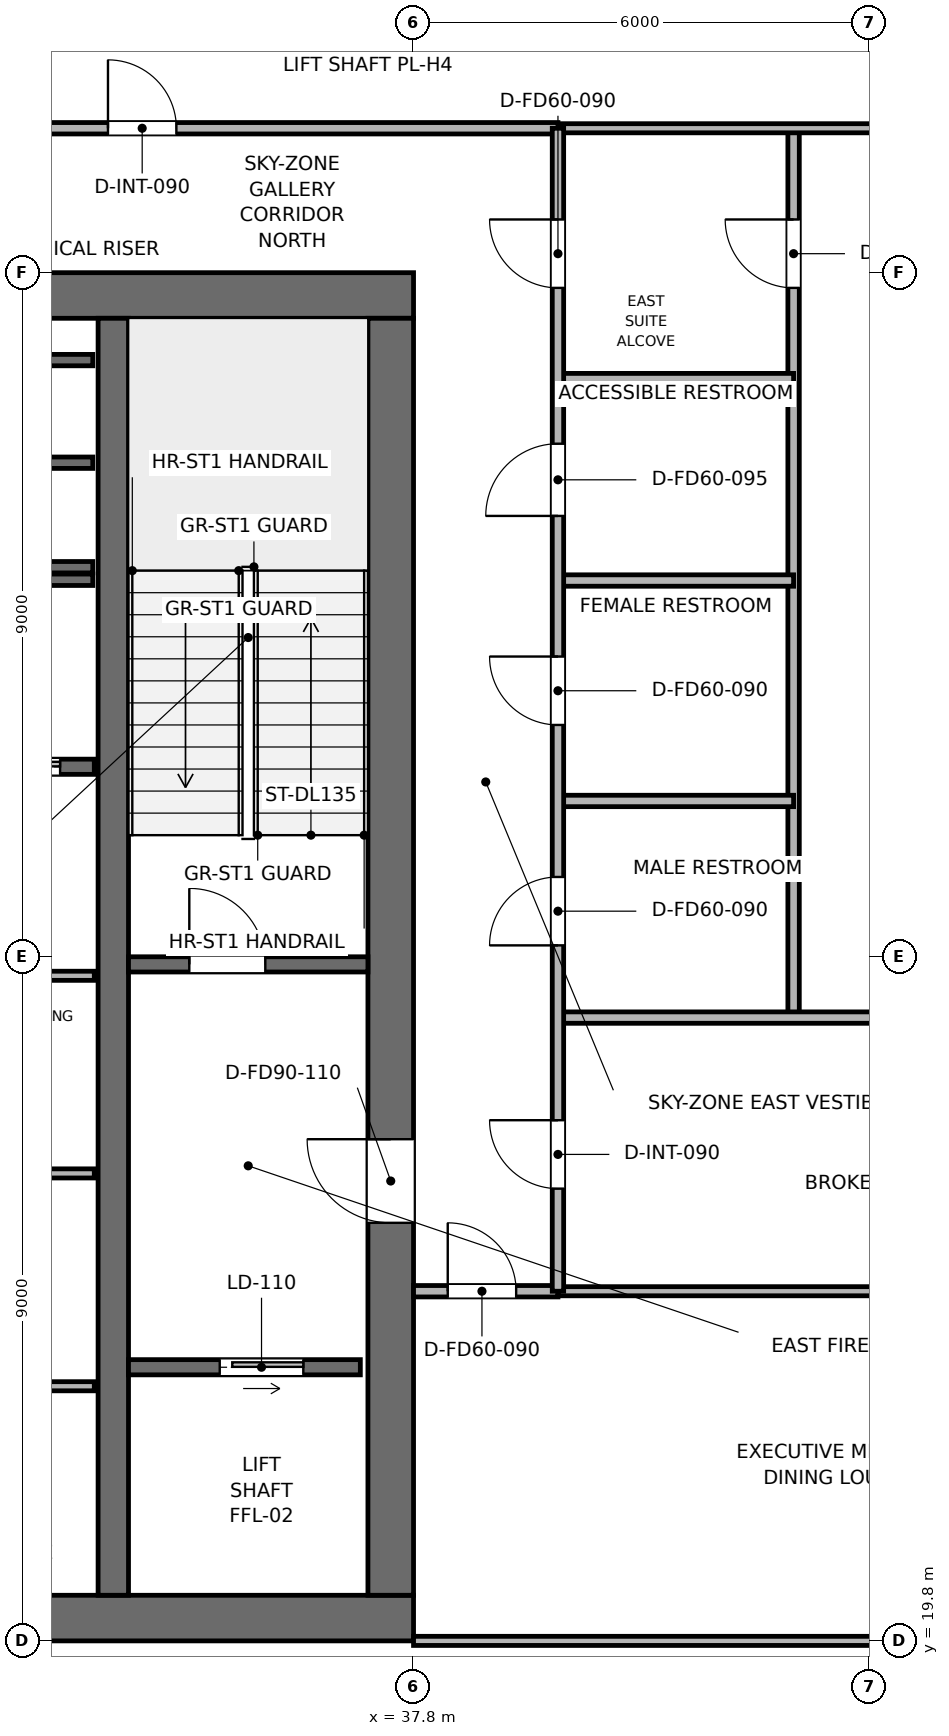
"""IFC4 building model, lengths in metres.
Left out: names, types, materials, properties, quantities, classifications, styles, units other than length and angle.
Written with IfcOpenShell. Run it as: python <this file> out.ifc"""

import sys

from ifc_helpers import new_model, si_unit, direction, frame, frame_2d, origin, place, context, subcontext, project, spatial, rectangle, extrude, element, fill, save


model = new_model("IFC4")
c1 = context("Model", 3, precision=1e-05, world=origin(), true_north=direction((0.0, 1.0)))
c2 = subcontext(c1, "Body", "Model", "MODEL_VIEW")
j1 = project(units=[si_unit("LENGTHUNIT", "METRE"), si_unit("PLANEANGLEUNIT", "RADIAN")], contexts=[c1])
p1 = place(None, origin())
s1 = spatial("IfcSite", under=j1, at=p1, CompositionType="ELEMENT")
p2 = place(p1, origin())
s2 = spatial("IfcBuilding", under=s1, at=p2, CompositionType="ELEMENT")
p3 = place(p2, frame((0.0, 0.0, 355.5)))
s3 = spatial("IfcBuildingStorey", under=s2, at=p3, CompositionType="ELEMENT", Elevation=355.5)
p4 = place(p3, frame((19.8, 20.1, 0.0), z_axis=(0.0, 0.0, 1.0), x_axis=(1.0, 0.0, 0.0)))
e1 = element("IfcWall", 1, at=p4, inside=s3, PredefinedType="SHEAR", context=c2, shape_type="SweptSolid", body=[
    extrude(rectangle(XDim=18.0, YDim=0.6, at=frame_2d((9.0, 0.0))), origin(), (0.0, 0.0, 1.0), 4.5),
])
p5 = place(p3, frame((19.8, 37.5, 0.0), z_axis=(0.0, 0.0, 1.0), x_axis=(1.0, 0.0, 0.0)))
e2 = element("IfcWall", 2, at=p5, inside=s3, PredefinedType="SHEAR", context=c2, shape_type="SweptSolid", body=[
    extrude(rectangle(XDim=18.0, YDim=0.6, at=frame_2d((9.0, 0.0))), origin(), (0.0, 0.0, 1.0), 4.5),
])
p6 = place(p5, frame((7.05, 0.0, 0.0)))
e3 = element("IfcOpeningElement", 3, at=p6, cuts=e2, PredefinedType="OPENING", context=c2, shape_type="SweptSolid", body=[
    extrude(rectangle(XDim=1.1, YDim=2.15, at=frame_2d((0.55, 1.075))), frame((0.0, 0.31, 0.0), z_axis=(0.0, -1.0, 0.0), x_axis=(1.0, 0.0, 0.0)), (0.0, 0.0, 1.0), 0.62),
])
p7 = place(p3, frame((37.5, 20.4, 0.0), z_axis=(0.0, 0.0, 1.0), x_axis=(0.0, 1.0, 0.0)))
e4 = element("IfcWall", 4, at=p7, inside=s3, PredefinedType="SHEAR", context=c2, shape_type="SweptSolid", body=[
    extrude(rectangle(XDim=16.8, YDim=0.6, at=frame_2d((8.4, 0.0))), origin(), (0.0, 0.0, 1.0), 4.5),
])
p8 = place(p7, frame((4.9, 0.0, 0.0)))
e5 = element("IfcOpeningElement", 5, at=p8, cuts=e4, PredefinedType="OPENING", context=c2, shape_type="SweptSolid", body=[
    extrude(rectangle(XDim=1.1, YDim=2.15, at=frame_2d((0.55, 1.075))), frame((0.0, 0.31, 0.0), z_axis=(0.0, -1.0, 0.0), x_axis=(1.0, 0.0, 0.0)), (0.0, 0.0, 1.0), 0.62),
])
p9 = place(p3, frame((33.85, 20.4, 0.0), z_axis=(0.0, 0.0, 1.0), x_axis=(0.0, 1.0, 0.0)))
e6 = element("IfcWall", 6, at=p9, inside=s3, PredefinedType="SHEAR", context=c2, shape_type="SweptSolid", body=[
    extrude(rectangle(XDim=16.8, YDim=0.4, at=frame_2d((8.4, 0.0))), origin(), (0.0, 0.0, 1.0), 4.5),
])
p10 = place(p3, frame((34.05, 28.7, 0.0), z_axis=(0.0, 0.0, 1.0), x_axis=(1.0, 0.0, 0.0)))
e7 = element("IfcWall", 7, at=p10, inside=s3, PredefinedType="SHEAR", context=c2, shape_type="SweptSolid", body=[
    extrude(rectangle(XDim=3.15, YDim=0.2, at=frame_2d((1.575, 0.0))), origin(), (0.0, 0.0, 1.0), 4.24),
])
p11 = place(p10, frame((0.8, 0.0, 0.0)))
e8 = element("IfcOpeningElement", 8, at=p11, cuts=e7, PredefinedType="OPENING", context=c2, shape_type="SweptSolid", body=[
    extrude(rectangle(XDim=1.0, YDim=2.1, at=frame_2d((0.5, 1.05))), frame((0.0, 0.11, 0.0), z_axis=(0.0, -1.0, 0.0), x_axis=(1.0, 0.0, 0.0)), (0.0, 0.0, 1.0), 0.22),
])
for number, where, z_axis, x_axis in (
    (9, (32.25, 33.925, 0.0), (0.0, 0.0, 1.0), (1.0, 0.0, 0.0)),
    (10, (32.25, 35.3, 0.0), (0.0, 0.0, 1.0), (1.0, 0.0, 0.0)),
):
    element("IfcWall", number, at=place(p3, frame(where, z_axis=z_axis, x_axis=x_axis)), inside=s3, PredefinedType="SHEAR", context=c2, shape_type="SweptSolid", body=[
        extrude(rectangle(XDim=1.33, YDim=0.15, at=frame_2d((0.665, 0.0))), origin(), (0.0, 0.0, 1.0), 4.24),
    ])
p12 = place(p3, frame((34.05, 23.4, 0.0), z_axis=(0.0, 0.0, 1.0), x_axis=(1.0, 0.0, 0.0)))
e11 = element("IfcWall", 11, at=p12, inside=s3, PredefinedType="SHEAR", context=c2, shape_type="SweptSolid", body=[
    extrude(rectangle(XDim=3.05, YDim=0.2, at=frame_2d((1.525, 0.0))), origin(), (0.0, 0.0, 1.0), 4.24),
])
p13 = place(p12, frame((1.2, 0.0, 0.0)))
e12 = element("IfcOpeningElement", 12, at=p13, cuts=e11, PredefinedType="OPENING", context=c2, shape_type="SweptSolid", body=[
    extrude(rectangle(XDim=1.1, YDim=2.15, at=frame_2d((0.55, 1.075))), frame((0.0, 0.11, 0.0), z_axis=(0.0, -1.0, 0.0), x_axis=(1.0, 0.0, 0.0)), (0.0, 0.0, 1.0), 0.22),
])
p14 = place(p3, frame((31.6, 31.3, 0.0), z_axis=(0.0, 0.0, 1.0), x_axis=(1.0, 0.0, 0.0)))
e13 = element("IfcWall", 13, at=p14, inside=s3, PredefinedType="SHEAR", context=c2, shape_type="SweptSolid", body=[
    extrude(rectangle(XDim=2.0, YDim=0.2, at=frame_2d((1.0, 0.0))), origin(), (0.0, 0.0, 1.0), 4.24),
])
p15 = place(p14, frame((0.45, 0.0, 0.0)))
e14 = element("IfcOpeningElement", 14, at=p15, cuts=e13, PredefinedType="OPENING", context=c2, shape_type="SweptSolid", body=[
    extrude(rectangle(XDim=1.1, YDim=2.15, at=frame_2d((0.55, 1.075))), frame((0.0, 0.11, 0.0), z_axis=(0.0, -1.0, 0.0), x_axis=(1.0, 0.0, 0.0)), (0.0, 0.0, 1.0), 0.22),
])
p16 = place(p3, frame((32.25, 36.65, 0.0), z_axis=(0.0, 0.0, 1.0), x_axis=(1.0, 0.0, 0.0)))
e15 = element("IfcWall", 15, at=p16, inside=s3, PredefinedType="SHEAR", context=c2, shape_type="SweptSolid", body=[
    extrude(rectangle(XDim=1.33, YDim=0.15, at=frame_2d((0.665, 0.0))), origin(), (0.0, 0.0, 1.0), 4.24),
])
p17 = place(p3, frame((29.5, 33.76, 0.0), z_axis=(0.0, 0.0, 1.0), x_axis=(1.0, 0.0, 0.0)))
e16 = element("IfcWall", 16, at=p17, inside=s3, PredefinedType="SHEAR", context=c2, shape_type="SweptSolid", body=[
    extrude(rectangle(XDim=4.08, YDim=0.15, at=frame_2d((2.04, 0.0))), origin(), (0.0, 0.0, 1.0), 4.24),
])
p18 = place(p3, frame((29.55, 23.15, 0.0), z_axis=(0.0, 0.0, 1.0), x_axis=(1.0, 0.0, 0.0)))
e17 = element("IfcWall", 17, at=p18, inside=s3, PredefinedType="PARTITIONING", context=c2, shape_type="SweptSolid", body=[
    extrude(rectangle(XDim=4.05, YDim=0.12, at=frame_2d((2.025, 0.0))), origin(), (0.0, 0.0, 1.0), 4.24),
])
p19 = place(p18, frame((1.575, 0.0, 0.0)))
e18 = element("IfcOpeningElement", 18, at=p19, cuts=e17, PredefinedType="OPENING", context=c2, shape_type="SweptSolid", body=[
    extrude(rectangle(XDim=0.9, YDim=2.1, at=frame_2d((0.45, 1.05))), frame((0.0, 0.07, 0.0), z_axis=(0.0, -1.0, 0.0), x_axis=(1.0, 0.0, 0.0)), (0.0, 0.0, 1.0), 0.14),
])
p20 = place(p3, frame((29.55, 25.95, 0.0), z_axis=(0.0, 0.0, 1.0), x_axis=(1.0, 0.0, 0.0)))
e19 = element("IfcWall", 19, at=p20, inside=s3, PredefinedType="PARTITIONING", context=c2, shape_type="SweptSolid", body=[
    extrude(rectangle(XDim=4.05, YDim=0.12, at=frame_2d((2.025, 0.0))), origin(), (0.0, 0.0, 1.0), 4.24),
])
p21 = place(p20, frame((1.575, 0.0, 0.0)))
e20 = element("IfcOpeningElement", 20, at=p21, cuts=e19, PredefinedType="OPENING", context=c2, shape_type="SweptSolid", body=[
    extrude(rectangle(XDim=0.9, YDim=2.1, at=frame_2d((0.45, 1.05))), frame((0.0, 0.07, 0.0), z_axis=(0.0, -1.0, 0.0), x_axis=(1.0, 0.0, 0.0)), (0.0, 0.0, 1.0), 0.14),
])
p22 = place(p3, frame((29.55, 28.55, 0.0), z_axis=(0.0, 0.0, 1.0), x_axis=(1.0, 0.0, 0.0)))
e21 = element("IfcWall", 21, at=p22, inside=s3, PredefinedType="PARTITIONING", context=c2, shape_type="SweptSolid", body=[
    extrude(rectangle(XDim=4.05, YDim=0.12, at=frame_2d((2.025, 0.0))), origin(), (0.0, 0.0, 1.0), 4.24),
])
p23 = place(p3, frame((37.8, 19.8, 0.0), z_axis=(0.0, 0.0, 1.0), x_axis=(1.0, 0.0, 0.0)))
e22 = element("IfcWall", 22, at=p23, inside=s3, PredefinedType="PARTITIONING", context=c2, shape_type="SweptSolid", body=[
    extrude(rectangle(XDim=11.27, YDim=0.12, at=frame_2d((5.635, 0.0))), origin(), (0.0, 0.0, 1.0), 3.825),
])
p24 = place(p3, frame((37.8, 24.4, 0.0), z_axis=(0.0, 0.0, 1.0), x_axis=(1.0, 0.0, 0.0)))
e23 = element("IfcWall", 23, at=p24, inside=s3, PredefinedType="PARTITIONING", context=c2, shape_type="SweptSolid", body=[
    extrude(rectangle(XDim=1.9, YDim=0.15, at=frame_2d((0.95, 0.0))), origin(), (0.0, 0.0, 1.0), 4.24),
])
p25 = place(p24, frame((0.45, 0.0, 0.0)))
e24 = element("IfcOpeningElement", 24, at=p25, cuts=e23, PredefinedType="OPENING", context=c2, shape_type="SweptSolid", body=[
    extrude(rectangle(XDim=0.9, YDim=2.1, at=frame_2d((0.45, 1.05))), frame((0.0, 0.085, 0.0), z_axis=(0.0, -1.0, 0.0), x_axis=(1.0, 0.0, 0.0)), (0.0, 0.0, 1.0), 0.17),
])
p26 = place(p3, frame((39.7, 24.4, 0.0), z_axis=(0.0, 0.0, 1.0), x_axis=(1.0, 0.0, 0.0)))
e25 = element("IfcWall", 25, at=p26, inside=s3, PredefinedType="PARTITIONING", context=c2, shape_type="SweptSolid", body=[
    extrude(rectangle(XDim=9.37, YDim=0.12, at=frame_2d((4.685, 0.0))), origin(), (0.0, 0.0, 1.0), 3.865),
])
p27 = place(p3, frame((42.8, 28.0, 0.0), z_axis=(0.0, 0.0, 1.0), x_axis=(0.0, 1.0, 0.0)))
e26 = element("IfcWall", 26, at=p27, inside=s3, PredefinedType="PARTITIONING", context=c2, shape_type="SweptSolid", body=[
    extrude(rectangle(XDim=11.7, YDim=0.15, at=frame_2d((5.85, 0.0))), origin(), (0.0, 0.0, 1.0), 3.825),
])
p28 = place(p27, frame((9.6, 0.0, 0.0)))
e27 = element("IfcOpeningElement", 27, at=p28, cuts=e26, PredefinedType="OPENING", context=c2, shape_type="SweptSolid", body=[
    extrude(rectangle(XDim=0.9, YDim=2.1, at=frame_2d((0.45, 1.05))), frame((0.0, 0.085, 0.0), z_axis=(0.0, -1.0, 0.0), x_axis=(1.0, 0.0, 0.0)), (0.0, 0.0, 1.0), 0.17),
])
p29 = place(p3, frame((39.7, 28.0, 0.0), z_axis=(0.0, 0.0, 1.0), x_axis=(1.0, 0.0, 0.0)))
e28 = element("IfcWall", 28, at=p29, inside=s3, PredefinedType="PARTITIONING", context=c2, shape_type="SweptSolid", body=[
    extrude(rectangle(XDim=9.37, YDim=0.15, at=frame_2d((4.685, 0.0))), origin(), (0.0, 0.0, 1.0), 3.865),
])
for number, where, z_axis, x_axis in (
    (29, (39.7, 36.4, 0.0), (0.0, 0.0, 1.0), (1.0, 0.0, 0.0)),
    (30, (39.7, 30.85, 0.0), (0.0, 0.0, 1.0), (1.0, 0.0, 0.0)),
    (31, (39.7, 33.75, 0.0), (0.0, 0.0, 1.0), (1.0, 0.0, 0.0)),
):
    element("IfcWall", number, at=place(p3, frame(where, z_axis=z_axis, x_axis=x_axis)), inside=s3, PredefinedType="PARTITIONING", context=c2, shape_type="SweptSolid", body=[
        extrude(rectangle(XDim=3.1, YDim=0.15, at=frame_2d((1.55, 0.0))), origin(), (0.0, 0.0, 1.0), 3.865),
    ])
p30 = place(p3, frame((39.7, 39.7, 0.0), z_axis=(0.0, 0.0, 1.0), x_axis=(1.0, 0.0, 0.0)))
e32 = element("IfcWall", 32, at=p30, inside=s3, PredefinedType="PARTITIONING", context=c2, shape_type="SweptSolid", body=[
    extrude(rectangle(XDim=9.37, YDim=0.12, at=frame_2d((4.685, 0.0))), origin(), (0.0, 0.0, 1.0), 3.825),
])
p31 = place(p3, frame((17.9, 39.7, 0.0), z_axis=(0.0, 0.0, 1.0), x_axis=(1.0, 0.0, 0.0)))
e33 = element("IfcWall", 33, at=p31, inside=s3, PredefinedType="PARTITIONING", context=c2, shape_type="SweptSolid", body=[
    extrude(rectangle(XDim=21.8, YDim=0.15, at=frame_2d((10.9, 0.0))), origin(), (0.0, 0.0, 1.0), 3.825),
])
p32 = place(p31, frame((0.765, 0.0, 0.0)))
e34 = element("IfcOpeningElement", 34, at=p32, cuts=e33, PredefinedType="OPENING", context=c2, shape_type="SweptSolid", body=[
    extrude(rectangle(XDim=0.9, YDim=2.1, at=frame_2d((0.45, 1.05))), frame((0.0, 0.085, 0.0), z_axis=(0.0, -1.0, 0.0), x_axis=(1.0, 0.0, 0.0)), (0.0, 0.0, 1.0), 0.17),
])
p33 = place(p31, frame((6.195, 0.0, 0.0)))
e35 = element("IfcOpeningElement", 35, at=p33, cuts=e33, PredefinedType="OPENING", context=c2, shape_type="SweptSolid", body=[
    extrude(rectangle(XDim=0.9, YDim=2.1, at=frame_2d((0.45, 1.05))), frame((0.0, 0.085, 0.0), z_axis=(0.0, -1.0, 0.0), x_axis=(1.0, 0.0, 0.0)), (0.0, 0.0, 1.0), 0.17),
])
p34 = place(p31, frame((15.88, 0.0, 0.0)))
e36 = element("IfcOpeningElement", 36, at=p34, cuts=e33, PredefinedType="OPENING", context=c2, shape_type="SweptSolid", body=[
    extrude(rectangle(XDim=0.9, YDim=2.1, at=frame_2d((0.45, 1.05))), frame((0.0, 0.085, 0.0), z_axis=(0.0, -1.0, 0.0), x_axis=(1.0, 0.0, 0.0)), (0.0, 0.0, 1.0), 0.17),
])
p35 = place(p3, frame((39.7, 24.4, 0.0), z_axis=(0.0, 0.0, 1.0), x_axis=(0.0, 1.0, 0.0)))
e37 = element("IfcWall", 37, at=p35, inside=s3, PredefinedType="PARTITIONING", context=c2, shape_type="SweptSolid", body=[
    extrude(rectangle(XDim=15.3, YDim=0.15, at=frame_2d((7.65, 0.0))), origin(), (0.0, 0.0, 1.0), 3.825),
])
p36 = place(p35, frame((1.35, 0.0, 0.0)))
e38 = element("IfcOpeningElement", 38, at=p36, cuts=e37, PredefinedType="OPENING", context=c2, shape_type="SweptSolid", body=[
    extrude(rectangle(XDim=0.9, YDim=2.1, at=frame_2d((0.45, 1.05))), frame((0.0, 0.085, 0.0), z_axis=(0.0, -1.0, 0.0), x_axis=(1.0, 0.0, 0.0)), (0.0, 0.0, 1.0), 0.17),
])
p37 = place(p35, frame((4.55, 0.0, 0.0)))
e39 = element("IfcOpeningElement", 39, at=p37, cuts=e37, PredefinedType="OPENING", context=c2, shape_type="SweptSolid", body=[
    extrude(rectangle(XDim=0.9, YDim=2.1, at=frame_2d((0.45, 1.05))), frame((0.0, 0.085, 0.0), z_axis=(0.0, -1.0, 0.0), x_axis=(1.0, 0.0, 0.0)), (0.0, 0.0, 1.0), 0.17),
])
p38 = place(p35, frame((7.45, 0.0, 0.0)))
e40 = element("IfcOpeningElement", 40, at=p38, cuts=e37, PredefinedType="OPENING", context=c2, shape_type="SweptSolid", body=[
    extrude(rectangle(XDim=0.9, YDim=2.1, at=frame_2d((0.45, 1.05))), frame((0.0, 0.085, 0.0), z_axis=(0.0, -1.0, 0.0), x_axis=(1.0, 0.0, 0.0)), (0.0, 0.0, 1.0), 0.17),
])
p39 = place(p35, frame((10.2, 0.0, 0.0)))
e41 = element("IfcOpeningElement", 41, at=p39, cuts=e37, PredefinedType="OPENING", context=c2, shape_type="SweptSolid", body=[
    extrude(rectangle(XDim=0.95, YDim=2.1, at=frame_2d((0.475, 1.05))), frame((0.0, 0.085, 0.0), z_axis=(0.0, -1.0, 0.0), x_axis=(1.0, 0.0, 0.0)), (0.0, 0.0, 1.0), 0.17),
])
p40 = place(p35, frame((13.2, 0.0, 0.0)))
e42 = element("IfcOpeningElement", 42, at=p40, cuts=e37, PredefinedType="OPENING", context=c2, shape_type="SweptSolid", body=[
    extrude(rectangle(XDim=0.9, YDim=2.1, at=frame_2d((0.45, 1.05))), frame((0.0, 0.085, 0.0), z_axis=(0.0, -1.0, 0.0), x_axis=(1.0, 0.0, 0.0)), (0.0, 0.0, 1.0), 0.17),
])
p41 = place(p11, origin())
e43 = element("IfcDoor", 43, at=p41, inside=s3, OperationType="SINGLE_SWING_LEFT", PredefinedType="DOOR", context=c2, shape_type="SweptSolid", body=[
    extrude(rectangle(XDim=1.0, YDim=2.1, at=frame_2d((0.5, 1.05))), frame((0.0, 0.025, 0.0), z_axis=(0.0, -1.0, 0.0), x_axis=(1.0, 0.0, 0.0)), (0.0, 0.0, 1.0), 0.05),
])
fill(e8, e43)
p42 = place(p13, origin())
e44 = element("IfcDoor", 44, at=p42, inside=s3, OperationType="SLIDING_TO_RIGHT", PredefinedType="DOOR", context=c2, shape_type="SweptSolid", body=[
    extrude(rectangle(XDim=1.1, YDim=2.15, at=frame_2d((0.55, 1.075))), frame((0.0, 0.025, 0.0), z_axis=(0.0, -1.0, 0.0), x_axis=(1.0, 0.0, 0.0)), (0.0, 0.0, 1.0), 0.05),
])
fill(e12, e44)
p43 = place(p15, origin())
e45 = element("IfcDoor", 45, at=p43, inside=s3, OperationType="SLIDING_TO_RIGHT", PredefinedType="DOOR", context=c2, shape_type="SweptSolid", body=[
    extrude(rectangle(XDim=1.1, YDim=2.15, at=frame_2d((0.55, 1.075))), frame((0.0, 0.025, 0.0), z_axis=(0.0, -1.0, 0.0), x_axis=(1.0, 0.0, 0.0)), (0.0, 0.0, 1.0), 0.05),
])
fill(e14, e45)
p44 = place(p25, origin())
e46 = element("IfcDoor", 46, at=p44, inside=s3, OperationType="SINGLE_SWING_LEFT", PredefinedType="DOOR", context=c2, shape_type="SweptSolid", body=[
    extrude(rectangle(XDim=0.9, YDim=2.1, at=frame_2d((0.45, 1.05))), frame((0.0, 0.025, 0.0), z_axis=(0.0, -1.0, 0.0), x_axis=(1.0, 0.0, 0.0)), (0.0, 0.0, 1.0), 0.05),
])
fill(e24, e46)
p45 = place(p28, origin())
e47 = element("IfcDoor", 47, at=p45, inside=s3, OperationType="SINGLE_SWING_RIGHT", PredefinedType="DOOR", context=c2, shape_type="SweptSolid", body=[
    extrude(rectangle(XDim=0.9, YDim=2.1, at=frame_2d((0.45, 1.05))), frame((0.0, 0.025, 0.0), z_axis=(0.0, -1.0, 0.0), x_axis=(1.0, 0.0, 0.0)), (0.0, 0.0, 1.0), 0.05),
])
fill(e27, e47)
p46 = place(p34, origin())
e48 = element("IfcDoor", 48, at=p46, inside=s3, OperationType="SINGLE_SWING_LEFT", PredefinedType="DOOR", context=c2, shape_type="SweptSolid", body=[
    extrude(rectangle(XDim=0.9, YDim=2.1, at=frame_2d((0.45, 1.05))), frame((0.0, 0.025, 0.0), z_axis=(0.0, -1.0, 0.0), x_axis=(1.0, 0.0, 0.0)), (0.0, 0.0, 1.0), 0.05),
])
fill(e36, e48)
p47 = place(p36, origin())
e49 = element("IfcDoor", 49, at=p47, inside=s3, OperationType="SINGLE_SWING_RIGHT", PredefinedType="DOOR", context=c2, shape_type="SweptSolid", body=[
    extrude(rectangle(XDim=0.9, YDim=2.1, at=frame_2d((0.45, 1.05))), frame((0.0, 0.025, 0.0), z_axis=(0.0, -1.0, 0.0), x_axis=(1.0, 0.0, 0.0)), (0.0, 0.0, 1.0), 0.05),
])
fill(e38, e49)
p48 = place(p37, origin())
e50 = element("IfcDoor", 50, at=p48, inside=s3, OperationType="SINGLE_SWING_LEFT", PredefinedType="DOOR", context=c2, shape_type="SweptSolid", body=[
    extrude(rectangle(XDim=0.9, YDim=2.1, at=frame_2d((0.45, 1.05))), frame((0.0, 0.025, 0.0), z_axis=(0.0, -1.0, 0.0), x_axis=(1.0, 0.0, 0.0)), (0.0, 0.0, 1.0), 0.05),
])
fill(e39, e50)
p49 = place(p38, origin())
e51 = element("IfcDoor", 51, at=p49, inside=s3, OperationType="SINGLE_SWING_RIGHT", PredefinedType="DOOR", context=c2, shape_type="SweptSolid", body=[
    extrude(rectangle(XDim=0.9, YDim=2.1, at=frame_2d((0.45, 1.05))), frame((0.0, 0.025, 0.0), z_axis=(0.0, -1.0, 0.0), x_axis=(1.0, 0.0, 0.0)), (0.0, 0.0, 1.0), 0.05),
])
fill(e40, e51)
p50 = place(p39, origin())
e52 = element("IfcDoor", 52, at=p50, inside=s3, OperationType="SINGLE_SWING_LEFT", PredefinedType="DOOR", context=c2, shape_type="SweptSolid", body=[
    extrude(rectangle(XDim=0.95, YDim=2.1, at=frame_2d((0.475, 1.05))), frame((0.0, 0.025, 0.0), z_axis=(0.0, -1.0, 0.0), x_axis=(1.0, 0.0, 0.0)), (0.0, 0.0, 1.0), 0.05),
])
fill(e41, e52)
p51 = place(p40, origin())
e53 = element("IfcDoor", 53, at=p51, inside=s3, OperationType="SINGLE_SWING_RIGHT", PredefinedType="DOOR", context=c2, shape_type="SweptSolid", body=[
    extrude(rectangle(XDim=0.9, YDim=2.1, at=frame_2d((0.45, 1.05))), frame((0.0, 0.025, 0.0), z_axis=(0.0, -1.0, 0.0), x_axis=(1.0, 0.0, 0.0)), (0.0, 0.0, 1.0), 0.05),
])
fill(e42, e53)
p52 = place(p8, origin())
e54 = element("IfcDoor", 54, at=p52, inside=s3, OperationType="SINGLE_SWING_RIGHT", PredefinedType="DOOR", context=c2, shape_type="SweptSolid", body=[
    extrude(rectangle(XDim=1.1, YDim=2.15, at=frame_2d((0.55, 1.075))), frame((0.0, 0.025, 0.0), z_axis=(0.0, -1.0, 0.0), x_axis=(1.0, 0.0, 0.0)), (0.0, 0.0, 1.0), 0.05),
])
fill(e5, e54)
save(model, sys.argv[1])
